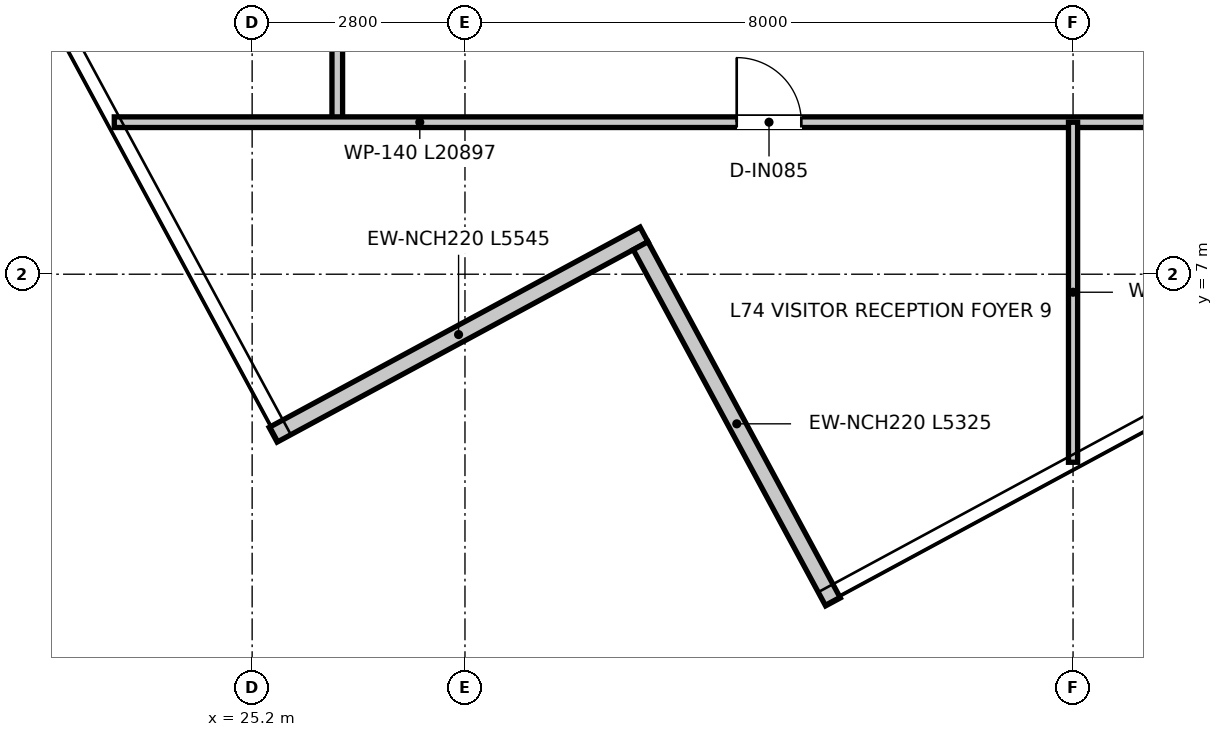
"""IFC4 building model, lengths in metres.
Left out: names, types, materials, properties, quantities, classifications, styles, units other than length and angle.
Written with IfcOpenShell. Run it as: python <this file> out.ifc"""

import sys

from ifc_helpers import new_model, si_unit, direction, frame, frame_2d, origin, place, context, subcontext, project, spatial, rectangle, extrude, element, fill, save


model = new_model("IFC4")
c1 = context("Model", 3, precision=1e-05, world=origin(), true_north=direction((0.0, 1.0)))
c2 = subcontext(c1, "Body", "Model", "MODEL_VIEW")
j1 = project(units=[si_unit("LENGTHUNIT", "METRE"), si_unit("PLANEANGLEUNIT", "RADIAN")], contexts=[c1])
p1 = place(None, origin())
s1 = spatial("IfcSite", under=j1, at=p1, CompositionType="ELEMENT")
p2 = place(p1, origin())
s2 = spatial("IfcBuilding", under=s1, at=p2, CompositionType="ELEMENT")
p3 = place(p2, frame((0.0, 0.0, 302.95)))
s3 = spatial("IfcBuildingStorey", under=s2, at=p3, CompositionType="ELEMENT", Elevation=302.95)
p4 = place(p3, frame((25.477, 4.888, 0.0), z_axis=(0.0, 0.0, 1.0), x_axis=(0.879846852796, 0.475257315172, 0.0)))
e1 = element("IfcWall", 1, at=p4, inside=s3, PredefinedType="ELEMENTEDWALL", context=c2, shape_type="SweptSolid", body=[
    extrude(rectangle(XDim=5.545, YDim=0.22, at=frame_2d((2.772, 0.0))), origin(), (0.0, 0.0, 1.0), 3.67),
])
p5 = place(p3, frame((30.311, 7.375, 0.0), z_axis=(0.0, 0.0, 1.0), x_axis=(0.475250431035, -0.879850571291, 0.0)))
e2 = element("IfcWall", 2, at=p5, inside=s3, PredefinedType="ELEMENTEDWALL", context=c2, shape_type="SweptSolid", body=[
    extrude(rectangle(XDim=5.325, YDim=0.22, at=frame_2d((2.663, 0.0))), origin(), (0.0, 0.0, 1.0), 3.67),
])
p6 = place(p3, frame((26.32, 9.0, 0.0), z_axis=(0.0, 0.0, 1.0), x_axis=(0.0, 1.0, 0.0)))
e3 = element("IfcWall", 3, at=p6, inside=s3, PredefinedType="PARTITIONING", context=c2, shape_type="SweptSolid", body=[
    extrude(rectangle(XDim=19.66, YDim=0.14, at=frame_2d((9.83, 0.0))), origin(), (0.0, 0.0, 1.0), 3.13),
])
p7 = place(p6, frame((18.3, 0.0, 0.0)))
e4 = element("IfcOpeningElement", 4, at=p7, cuts=e3, PredefinedType="OPENING", context=c2, shape_type="SweptSolid", body=[
    extrude(rectangle(XDim=0.9, YDim=2.1, at=frame_2d((0.45, 1.05))), frame((0.0, 0.08, 0.0), z_axis=(0.0, -1.0, 0.0), x_axis=(1.0, 0.0, 0.0)), (0.0, 0.0, 1.0), 0.16),
])
p8 = place(p6, frame((1.95, 0.0, 0.0)))
e5 = element("IfcOpeningElement", 5, at=p8, cuts=e3, PredefinedType="OPENING", context=c2, shape_type="SweptSolid", body=[
    extrude(rectangle(XDim=0.9, YDim=2.1, at=frame_2d((0.45, 1.05))), frame((0.0, 0.08, 0.0), z_axis=(0.0, -1.0, 0.0), x_axis=(1.0, 0.0, 0.0)), (0.0, 0.0, 1.0), 0.16),
])
p9 = place(p6, frame((10.3, 0.0, 0.0)))
e6 = element("IfcOpeningElement", 6, at=p9, cuts=e3, PredefinedType="OPENING", context=c2, shape_type="SweptSolid", body=[
    extrude(rectangle(XDim=0.9, YDim=2.1, at=frame_2d((0.45, 1.05))), frame((0.0, 0.08, 0.0), z_axis=(0.0, -1.0, 0.0), x_axis=(1.0, 0.0, 0.0)), (0.0, 0.0, 1.0), 0.16),
])
p10 = place(p6, frame((14.96, 0.0, 0.0)))
e7 = element("IfcOpeningElement", 7, at=p10, cuts=e3, PredefinedType="OPENING", context=c2, shape_type="SweptSolid", body=[
    extrude(rectangle(XDim=0.9, YDim=2.1, at=frame_2d((0.45, 1.05))), frame((0.0, 0.08, 0.0), z_axis=(0.0, -1.0, 0.0), x_axis=(1.0, 0.0, 0.0)), (0.0, 0.0, 1.0), 0.16),
])
p11 = place(p3, frame((23.386, 9.0, 0.0), z_axis=(0.0, 0.0, 1.0), x_axis=(1.0, 0.0, 0.0)))
e8 = element("IfcWall", 8, at=p11, inside=s3, PredefinedType="PARTITIONING", context=c2, shape_type="SweptSolid", body=[
    extrude(rectangle(XDim=20.897, YDim=0.14, at=frame_2d((10.448, 0.0))), origin(), (0.0, 0.0, 1.0), 3.67),
])
p12 = place(p11, frame((8.189, 0.0, 0.0)))
e9 = element("IfcOpeningElement", 9, at=p12, cuts=e8, PredefinedType="OPENING", context=c2, shape_type="SweptSolid", body=[
    extrude(rectangle(XDim=0.85, YDim=2.1, at=frame_2d((0.425, 1.05))), frame((0.0, 0.08, 0.0), z_axis=(0.0, -1.0, 0.0), x_axis=(1.0, 0.0, 0.0)), (0.0, 0.0, 1.0), 0.16),
])
p13 = place(p11, frame((16.189, 0.0, 0.0)))
e10 = element("IfcOpeningElement", 10, at=p13, cuts=e8, PredefinedType="OPENING", context=c2, shape_type="SweptSolid", body=[
    extrude(rectangle(XDim=0.85, YDim=2.1, at=frame_2d((0.425, 1.05))), frame((0.0, 0.08, 0.0), z_axis=(0.0, -1.0, 0.0), x_axis=(1.0, 0.0, 0.0)), (0.0, 0.0, 1.0), 0.16),
])
p14 = place(p3, frame((36.0, 4.526, 0.0), z_axis=(0.0, 0.0, 1.0), x_axis=(0.0, 1.0, 0.0)))
e11 = element("IfcWall", 11, at=p14, inside=s3, PredefinedType="PARTITIONING", context=c2, shape_type="SweptSolid", body=[
    extrude(rectangle(XDim=4.474, YDim=0.12, at=frame_2d((2.237, 0.0))), origin(), (0.0, 0.0, 1.0), 3.67),
])
p15 = place(p12, origin())
e12 = element("IfcDoor", 12, at=p15, inside=s3, OperationType="SINGLE_SWING_LEFT", PredefinedType="DOOR", context=c2, shape_type="SweptSolid", body=[
    extrude(rectangle(XDim=0.85, YDim=2.1, at=frame_2d((0.425, 1.05))), frame((0.0, 0.025, 0.0), z_axis=(0.0, -1.0, 0.0), x_axis=(1.0, 0.0, 0.0)), (0.0, 0.0, 1.0), 0.05),
])
fill(e9, e12)
save(model, sys.argv[1])
